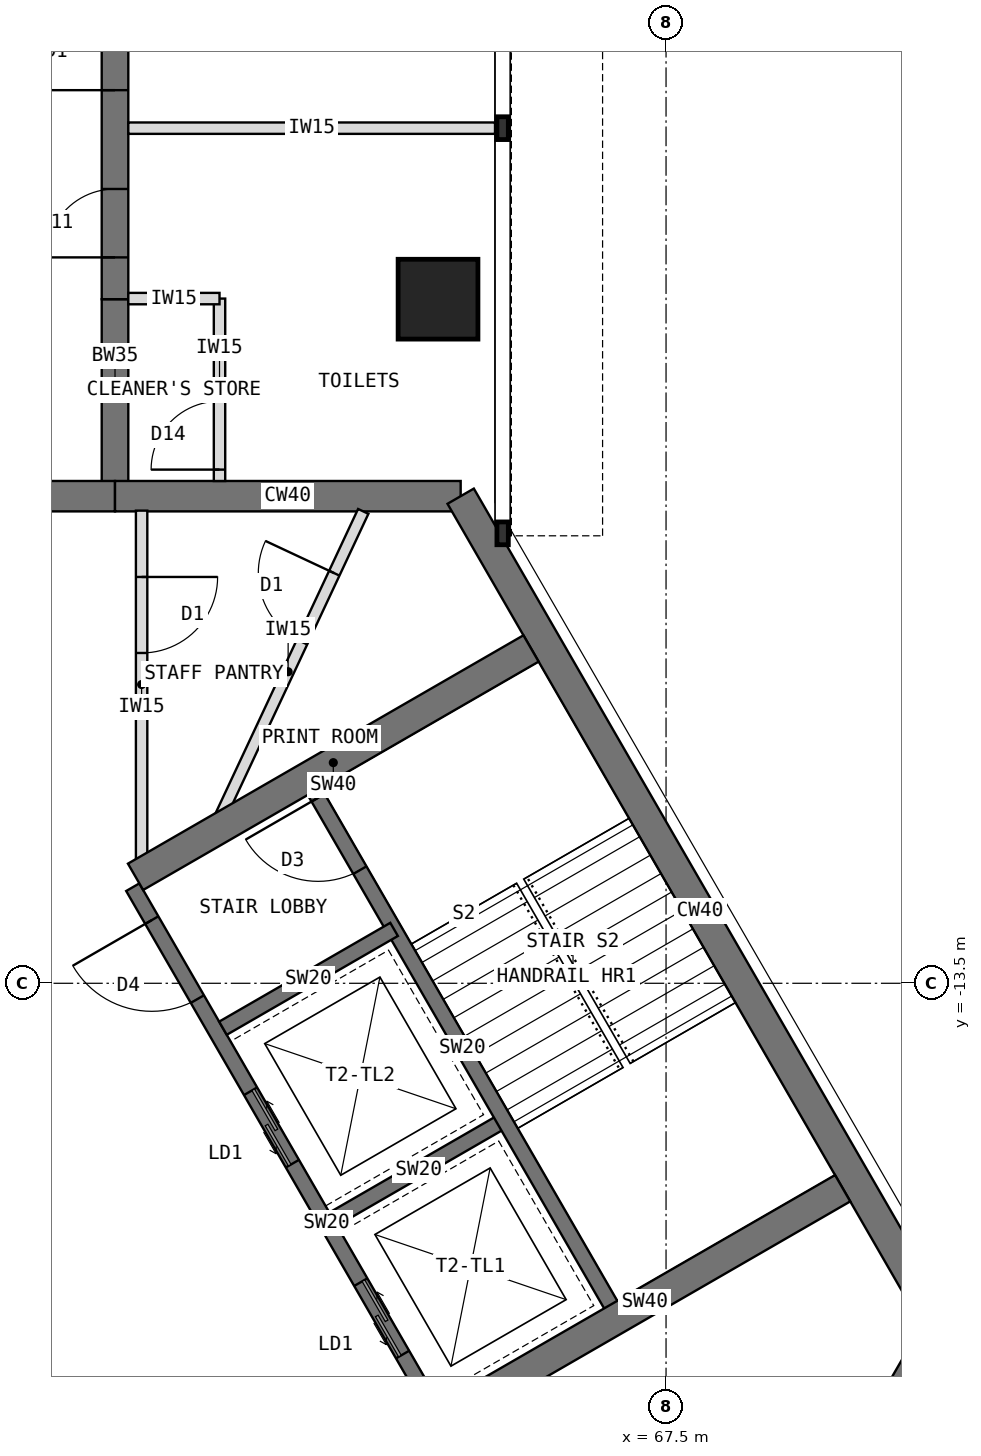
"""IFC4 building model, lengths in metres.
Left out: names, types, materials, properties, quantities, classifications, styles, units other than length and angle.
Written with IfcOpenShell. Run it as: python <this file> out.ifc"""

import sys

from ifc_helpers import new_model, si_unit, direction, frame, frame_2d, origin, origin_2d, place, context, subcontext, project, spatial, rectangle, extrude, element, fill, save


model = new_model("IFC4")
c1 = context("Model", 3, precision=1e-05, world=origin(), true_north=direction((0.0, 1.0)))
c2 = subcontext(c1, "Body", "Model", "MODEL_VIEW")
j1 = project(units=[si_unit("LENGTHUNIT", "METRE"), si_unit("PLANEANGLEUNIT", "RADIAN")], contexts=[c1])
p1 = place(None, origin())
s1 = spatial("IfcSite", under=j1, at=p1, CompositionType="ELEMENT")
p2 = place(p1, origin())
s2 = spatial("IfcBuilding", under=s1, at=p2, CompositionType="ELEMENT")
p3 = place(p2, frame((0.0, 0.0, 259.5)))
s3 = spatial("IfcBuildingStorey", under=s2, at=p3, CompositionType="ELEMENT", Elevation=259.5)
p4 = place(p3, frame((64.798, -7.092, 0.0), z_axis=(0.0, 0.0, 1.0), x_axis=(-1.0, 0.0, 0.0)))
e1 = element("IfcWall", 1, at=p4, inside=s3, PredefinedType="SHEAR", context=c2, shape_type="SweptSolid", body=[
    extrude(rectangle(XDim=4.548, YDim=0.4, at=frame_2d((2.274, 0.0))), origin(), (0.0, 0.0, 1.0), 4.0),
])
p5 = place(p3, frame((60.25, -7.092, 0.0), z_axis=(0.0, 0.0, 1.0), x_axis=(-1.0, 0.0, 0.0)))
e2 = element("IfcWall", 2, at=p5, inside=s3, PredefinedType="SHEAR", context=c2, shape_type="SweptSolid", body=[
    extrude(rectangle(XDim=3.5, YDim=0.4, at=frame_2d((1.75, 0.0))), origin(), (0.0, 0.0, 1.0), 4.0),
])
p6 = place(p5, frame((0.85, 0.0, 0.0)))
e3 = element("IfcOpeningElement", 3, at=p6, cuts=e2, PredefinedType="OPENING", context=c2, shape_type="SweptSolid", body=[
    extrude(rectangle(XDim=1.8, YDim=2.1, at=frame_2d((0.9, 1.05))), frame((0.0, 0.21, 0.0), z_axis=(0.0, -1.0, 0.0), x_axis=(1.0, 0.0, 0.0)), (0.0, 0.0, 1.0), 0.42),
])
p7 = place(p3, frame((68.822, -21.939, 0.0), z_axis=(0.0, 0.0, 1.0), x_axis=(0.500024481964, 0.866011268655, 0.0)))
e4 = element("IfcWall", 4, at=p7, inside=s3, PredefinedType="SHEAR", context=c2, shape_type="SweptSolid", body=[
    extrude(rectangle(XDim=4.548, YDim=0.4, at=frame_2d((2.274, 0.0))), origin(), (0.0, 0.0, 1.0), 4.0),
])
p8 = place(p3, frame((71.096, -18.0, 0.0), z_axis=(0.0, 0.0, 1.0), x_axis=(-0.500005998175, 0.866021940709, 0.0)))
e5 = element("IfcWall", 5, at=p8, inside=s3, PredefinedType="SHEAR", context=c2, shape_type="SweptSolid", body=[
    extrude(rectangle(XDim=12.596, YDim=0.4, at=frame_2d((6.298, 0.0))), origin(), (0.0, 0.0, 1.0), 4.0),
])
p9 = place(p3, frame((60.25, -7.092, 0.0), z_axis=(0.0, 0.0, 1.0), x_axis=(0.0, 1.0, 0.0)))
e6 = element("IfcWall", 6, at=p9, inside=s3, PredefinedType="SHEAR", context=c2, shape_type="SweptSolid", body=[
    extrude(rectangle(XDim=2.592, YDim=0.35, at=frame_2d((1.296, 0.0))), origin(), (0.0, 0.0, 1.0), 4.0),
])
p10 = place(p3, frame((60.25, -4.5, 0.0), z_axis=(0.0, 0.0, 1.0), x_axis=(0.0, 1.0, 0.0)))
e7 = element("IfcWall", 7, at=p10, inside=s3, PredefinedType="SHEAR", context=c2, shape_type="SweptSolid", body=[
    extrude(rectangle(XDim=13.2, YDim=0.35, at=frame_2d((6.6, 0.0))), origin(), (0.0, 0.0, 1.0), 4.0),
])
p11 = place(p10, frame((0.55, 0.0, 0.0)))
e8 = element("IfcOpeningElement", 8, at=p11, cuts=e7, PredefinedType="OPENING", context=c2, shape_type="SweptSolid", body=[
    extrude(rectangle(XDim=0.9, YDim=2.1, at=frame_2d((0.45, 1.05))), frame((0.0, 0.185, 0.0), z_axis=(0.0, -1.0, 0.0), x_axis=(1.0, 0.0, 0.0)), (0.0, 0.0, 1.0), 0.37),
])
p12 = place(p10, frame((2.75, 0.0, 0.0)))
e9 = element("IfcOpeningElement", 9, at=p12, cuts=e7, PredefinedType="OPENING", context=c2, shape_type="SweptSolid", body=[
    extrude(rectangle(XDim=1.0, YDim=2.1, at=frame_2d((0.5, 1.05))), frame((0.0, 0.185, 0.0), z_axis=(0.0, -1.0, 0.0), x_axis=(1.0, 0.0, 0.0)), (0.0, 0.0, 1.0), 0.37),
])
p13 = place(p3, frame((64.5, -4.5, 0.0), z_axis=(0.0, 0.0, 1.0), x_axis=(1.0, 0.0, 0.0)))
e10 = element("IfcColumn", 10, at=p13, inside=s3, PredefinedType="COLUMN", context=c2, shape_type="SweptSolid", body=[
    extrude(rectangle(XDim=1.05, YDim=1.05, at=origin_2d()), origin(), (0.0, 0.0, 1.0), 4.0),
])
p14 = place(p3, frame((64.484, -19.164, 0.0), z_axis=(0.0, 0.0, 1.0), x_axis=(-0.49999894854, 0.866026010844, 0.0)))
e11 = element("IfcWall", 11, at=p14, inside=s3, PredefinedType="SHEAR", context=c2, shape_type="SweptSolid", body=[
    extrude(rectangle(XDim=8.0, YDim=0.2, at=frame_2d((4.0, 0.0))), origin(), (0.0, 0.0, 1.0), 4.0),
])
p15 = place(p14, frame((6.3, 0.0, 0.0)))
e12 = element("IfcOpeningElement", 12, at=p15, cuts=e11, PredefinedType="OPENING", context=c2, shape_type="SweptSolid", body=[
    extrude(rectangle(XDim=1.2, YDim=2.1, at=frame_2d((0.6, 1.05))), frame((0.0, 0.11, 0.0), z_axis=(0.0, -1.0, 0.0), x_axis=(1.0, 0.0, 0.0)), (0.0, 0.0, 1.0), 0.22),
])
p16 = place(p14, frame((0.9, 0.0, 0.0)))
e13 = element("IfcOpeningElement", 13, at=p16, cuts=e11, PredefinedType="OPENING", context=c2, shape_type="SweptSolid", body=[
    extrude(rectangle(XDim=1.1, YDim=2.2, at=frame_2d((0.55, 1.1))), frame((0.0, 0.11, 0.0), z_axis=(0.0, -1.0, 0.0), x_axis=(1.0, 0.0, 0.0)), (0.0, 0.0, 1.0), 0.22),
])
p17 = place(p14, frame((3.8, 0.0, 0.0)))
e14 = element("IfcOpeningElement", 14, at=p17, cuts=e11, PredefinedType="OPENING", context=c2, shape_type="SweptSolid", body=[
    extrude(rectangle(XDim=1.1, YDim=2.2, at=frame_2d((0.55, 1.1))), frame((0.0, 0.11, 0.0), z_axis=(0.0, -1.0, 0.0), x_axis=(1.0, 0.0, 0.0)), (0.0, 0.0, 1.0), 0.22),
])
p18 = place(p3, frame((63.12, -16.603, 0.0), z_axis=(0.0, 0.0, 1.0), x_axis=(0.866062058628, 0.499936506574, 0.0)))
e15 = element("IfcWall", 15, at=p18, inside=s3, PredefinedType="SHEAR", context=c2, shape_type="SweptSolid", body=[
    extrude(rectangle(XDim=2.6, YDim=0.2, at=frame_2d((1.3, 0.0))), origin(), (0.0, 0.0, 1.0), 4.0),
])
p19 = place(p3, frame((61.67, -14.091, 0.0), z_axis=(0.0, 0.0, 1.0), x_axis=(0.86603858612, 0.49997716683, 0.0)))
e16 = element("IfcWall", 16, at=p19, inside=s3, PredefinedType="SHEAR", context=c2, shape_type="SweptSolid", body=[
    extrude(rectangle(XDim=2.6, YDim=0.2, at=frame_2d((1.3, 0.0))), origin(), (0.0, 0.0, 1.0), 4.0),
])
p20 = place(p3, frame((66.822, -17.814, 0.0), z_axis=(0.0, 0.0, 1.0), x_axis=(-0.49999894854, 0.866026010844, 0.0)))
e17 = element("IfcWall", 17, at=p20, inside=s3, PredefinedType="SHEAR", context=c2, shape_type="SweptSolid", body=[
    extrude(rectangle(XDim=8.0, YDim=0.2, at=frame_2d((4.0, 0.0))), origin(), (0.0, 0.0, 1.0), 4.0),
])
p21 = place(p20, frame((6.7, 0.0, 0.0)))
e18 = element("IfcOpeningElement", 18, at=p21, cuts=e17, PredefinedType="OPENING", context=c2, shape_type="SweptSolid", body=[
    extrude(rectangle(XDim=1.1, YDim=2.1, at=frame_2d((0.55, 1.05))), frame((0.0, 0.11, 0.0), z_axis=(0.0, -1.0, 0.0), x_axis=(1.0, 0.0, 0.0)), (0.0, 0.0, 1.0), 0.22),
])
for number, where, z_axis, x_axis in (
    (19, (60.52, -12.099, 0.0), (0.0, 0.0, 1.0), (0.866, 0.5, 0.0)),
    (20, (64.62, -19.201, 0.0), (0.0, 0.0, 1.0), (0.866, 0.5, 0.0)),
):
    element("IfcWall", number, at=place(p3, frame(where, z_axis=z_axis, x_axis=x_axis)), inside=s3, PredefinedType="SHEAR", context=c2, shape_type="SweptSolid", body=[
        extrude(rectangle(XDim=6.008, YDim=0.4, at=frame_2d((3.004, 0.0))), origin(), (0.0, 0.0, 1.0), 4.0),
    ])
p22 = place(p3, frame((60.425, -2.25, 0.0), z_axis=(0.0, 0.0, 1.0), x_axis=(1.0, 0.0, 0.0)))
e21 = element("IfcWall", 21, at=p22, inside=s3, PredefinedType="PARTITIONING", context=c2, shape_type="SweptSolid", body=[
    extrude(rectangle(XDim=4.825, YDim=0.15, at=frame_2d((2.413, 0.0))), origin(), (0.0, 0.0, 1.0), 3.8),
])
p23 = place(p3, frame((61.625, -6.892, 0.0), z_axis=(0.0, 0.0, 1.0), x_axis=(0.0, 1.0, 0.0)))
e22 = element("IfcWall", 22, at=p23, inside=s3, PredefinedType="PARTITIONING", context=c2, shape_type="SweptSolid", body=[
    extrude(rectangle(XDim=2.4, YDim=0.15, at=frame_2d((1.2, 0.0))), origin(), (0.0, 0.0, 1.0), 3.8),
])
p24 = place(p23, frame((0.15, 0.0, 0.0)))
e23 = element("IfcOpeningElement", 23, at=p24, cuts=e22, PredefinedType="OPENING", context=c2, shape_type="SweptSolid", body=[
    extrude(rectangle(XDim=0.9, YDim=2.1, at=frame_2d((0.45, 1.05))), frame((0.0, 0.085, 0.0), z_axis=(0.0, -1.0, 0.0), x_axis=(1.0, 0.0, 0.0)), (0.0, 0.0, 1.0), 0.17),
])
p25 = place(p3, frame((60.425, -4.492, 0.0), z_axis=(0.0, 0.0, 1.0), x_axis=(1.0, 0.0, 0.0)))
e24 = element("IfcWall", 24, at=p25, inside=s3, PredefinedType="PARTITIONING", context=c2, shape_type="SweptSolid", body=[
    extrude(rectangle(XDim=1.2, YDim=0.15, at=frame_2d((0.6, 0.0))), origin(), (0.0, 0.0, 1.0), 3.267),
])
p26 = place(p3, frame((60.6, -7.282, 0.0), z_axis=(0.0, 0.0, 1.0), x_axis=(0.0, -1.0, 0.0)))
e25 = element("IfcWall", 25, at=p26, inside=s3, PredefinedType="PARTITIONING", context=c2, shape_type="SweptSolid", body=[
    extrude(rectangle(XDim=4.576, YDim=0.15, at=frame_2d((2.288, 0.0))), origin(), (0.0, 0.0, 1.0), 3.8),
])
p27 = place(p26, frame((0.873, 0.0, 0.0)))
e26 = element("IfcOpeningElement", 26, at=p27, cuts=e25, PredefinedType="OPENING", context=c2, shape_type="SweptSolid", body=[
    extrude(rectangle(XDim=1.0, YDim=2.1, at=frame_2d((0.5, 1.05))), frame((0.0, 0.085, 0.0), z_axis=(0.0, -1.0, 0.0), x_axis=(1.0, 0.0, 0.0)), (0.0, 0.0, 1.0), 0.17),
])
p28 = place(p3, frame((61.54, -11.511, 0.0), z_axis=(0.0, 0.0, 1.0), x_axis=(0.424198910408, 0.905569039007, 0.0)))
e27 = element("IfcWall", 27, at=p28, inside=s3, PredefinedType="PARTITIONING", context=c2, shape_type="SweptSolid", body=[
    extrude(rectangle(XDim=4.659, YDim=0.15, at=frame_2d((2.33, 0.0))), origin(), (0.0, 0.0, 1.0), 3.8),
])
p29 = place(p28, frame((2.761, 0.0, 0.0)))
e28 = element("IfcOpeningElement", 28, at=p29, cuts=e27, PredefinedType="OPENING", context=c2, shape_type="SweptSolid", body=[
    extrude(rectangle(XDim=1.0, YDim=2.1, at=frame_2d((0.5, 1.05))), frame((0.0, 0.085, 0.0), z_axis=(0.0, -1.0, 0.0), x_axis=(1.0, 0.0, 0.0)), (0.0, 0.0, 1.0), 0.17),
])
p30 = place(p15, origin())
e29 = element("IfcDoor", 29, at=p30, inside=s3, OperationType="SINGLE_SWING_RIGHT", PredefinedType="DOOR", context=c2, shape_type="SweptSolid", body=[
    extrude(rectangle(XDim=1.2, YDim=2.1, at=frame_2d((0.6, 1.05))), frame((0.0, 0.025, 0.0), z_axis=(0.0, -1.0, 0.0), x_axis=(1.0, 0.0, 0.0)), (0.0, 0.0, 1.0), 0.05),
])
fill(e12, e29)
p31 = place(p16, origin())
e30 = element("IfcDoor", 30, at=p31, inside=s3, OperationType="DOUBLE_DOOR_SLIDING", PredefinedType="DOOR", context=c2, shape_type="SweptSolid", body=[
    extrude(rectangle(XDim=1.1, YDim=2.2, at=frame_2d((0.55, 1.1))), frame((0.0, 0.025, 0.0), z_axis=(0.0, -1.0, 0.0), x_axis=(1.0, 0.0, 0.0)), (0.0, 0.0, 1.0), 0.05),
])
fill(e13, e30)
p32 = place(p17, origin())
e31 = element("IfcDoor", 31, at=p32, inside=s3, OperationType="DOUBLE_DOOR_SLIDING", PredefinedType="DOOR", context=c2, shape_type="SweptSolid", body=[
    extrude(rectangle(XDim=1.1, YDim=2.2, at=frame_2d((0.55, 1.1))), frame((0.0, 0.025, 0.0), z_axis=(0.0, -1.0, 0.0), x_axis=(1.0, 0.0, 0.0)), (0.0, 0.0, 1.0), 0.05),
])
fill(e14, e31)
p33 = place(p21, origin())
e32 = element("IfcDoor", 32, at=p33, inside=s3, OperationType="SINGLE_SWING_RIGHT", PredefinedType="DOOR", context=c2, shape_type="SweptSolid", body=[
    extrude(rectangle(XDim=1.1, YDim=2.1, at=frame_2d((0.55, 1.05))), frame((0.0, 0.025, 0.0), z_axis=(0.0, -1.0, 0.0), x_axis=(1.0, 0.0, 0.0)), (0.0, 0.0, 1.0), 0.05),
])
fill(e18, e32)
p34 = place(p24, origin())
e33 = element("IfcDoor", 33, at=p34, inside=s3, OperationType="SINGLE_SWING_LEFT", PredefinedType="DOOR", context=c2, shape_type="SweptSolid", body=[
    extrude(rectangle(XDim=0.9, YDim=2.1, at=frame_2d((0.45, 1.05))), frame((0.0, 0.025, 0.0), z_axis=(0.0, -1.0, 0.0), x_axis=(1.0, 0.0, 0.0)), (0.0, 0.0, 1.0), 0.05),
])
fill(e23, e33)
p35 = place(p27, origin())
e34 = element("IfcDoor", 34, at=p35, inside=s3, OperationType="SINGLE_SWING_LEFT", PredefinedType="DOOR", context=c2, shape_type="SweptSolid", body=[
    extrude(rectangle(XDim=1.0, YDim=2.1, at=frame_2d((0.5, 1.05))), frame((0.0, 0.025, 0.0), z_axis=(0.0, -1.0, 0.0), x_axis=(1.0, 0.0, 0.0)), (0.0, 0.0, 1.0), 0.05),
])
fill(e26, e34)
p36 = place(p29, origin())
e35 = element("IfcDoor", 35, at=p36, inside=s3, OperationType="SINGLE_SWING_RIGHT", PredefinedType="DOOR", context=c2, shape_type="SweptSolid", body=[
    extrude(rectangle(XDim=1.0, YDim=2.1, at=frame_2d((0.5, 1.05))), frame((0.0, 0.025, 0.0), z_axis=(0.0, -1.0, 0.0), x_axis=(1.0, 0.0, 0.0)), (0.0, 0.0, 1.0), 0.05),
])
fill(e28, e35)
p37 = place(p11, origin())
e36 = element("IfcDoor", 36, at=p37, inside=s3, OperationType="SINGLE_SWING_LEFT", PredefinedType="DOOR", context=c2, shape_type="SweptSolid", body=[
    extrude(rectangle(XDim=0.9, YDim=2.1, at=frame_2d((0.45, 1.05))), frame((0.0, 0.025, 0.0), z_axis=(0.0, -1.0, 0.0), x_axis=(1.0, 0.0, 0.0)), (0.0, 0.0, 1.0), 0.05),
])
fill(e8, e36)
p38 = place(p12, origin())
e37 = element("IfcDoor", 37, at=p38, inside=s3, OperationType="SINGLE_SWING_LEFT", PredefinedType="DOOR", context=c2, shape_type="SweptSolid", body=[
    extrude(rectangle(XDim=1.0, YDim=2.1, at=frame_2d((0.5, 1.05))), frame((0.0, 0.025, 0.0), z_axis=(0.0, -1.0, 0.0), x_axis=(1.0, 0.0, 0.0)), (0.0, 0.0, 1.0), 0.05),
])
fill(e9, e37)
save(model, sys.argv[1])
